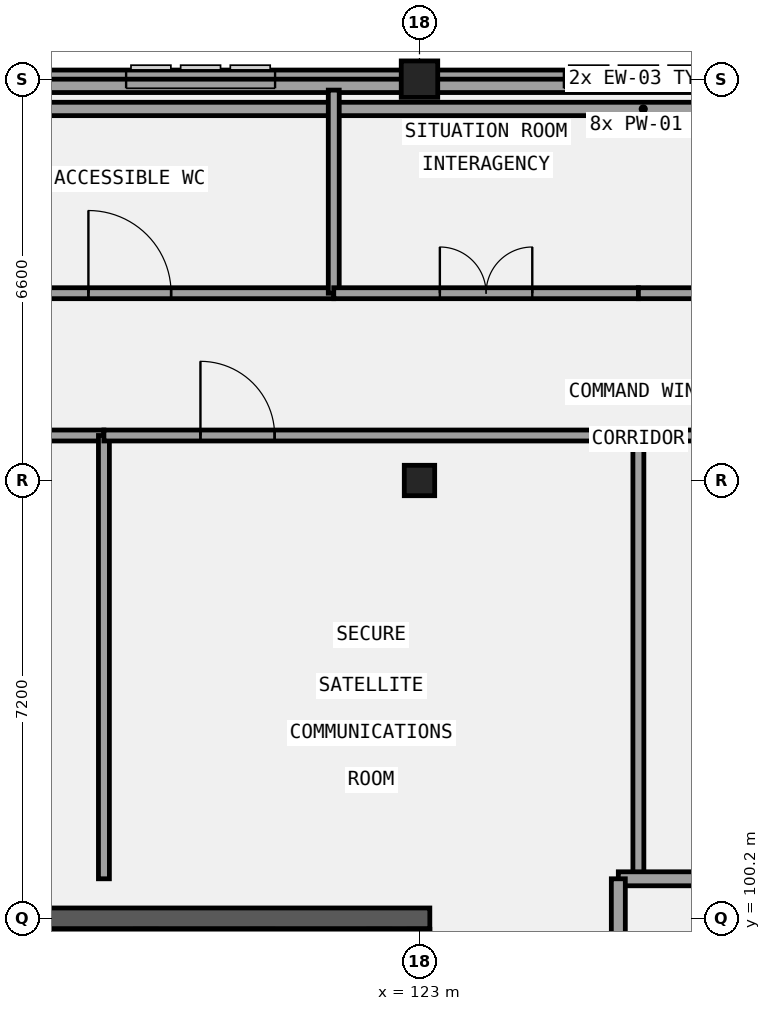
"""IFC4 building model, lengths in metres.
Left out: names, types, materials, properties, quantities, classifications, styles, units other than length and angle.
Written with IfcOpenShell. Run it as: python <this file> out.ifc"""

import sys

from ifc_helpers import new_model, si_unit, direction, frame, frame_2d, origin, origin_2d, place, context, subcontext, project, spatial, rectangle, extrude, element, fill, save


model = new_model("IFC4")
c1 = context("Model", 3, precision=1e-05, world=origin(), true_north=direction((0.0, 1.0)))
c2 = subcontext(c1, "Body", "Model", "MODEL_VIEW")
j1 = project(units=[si_unit("LENGTHUNIT", "METRE"), si_unit("PLANEANGLEUNIT", "RADIAN")], contexts=[c1])
p1 = place(None, origin())
s1 = spatial("IfcSite", under=j1, at=p1, CompositionType="ELEMENT")
p2 = place(p1, origin())
s2 = spatial("IfcBuilding", under=s1, at=p2, CompositionType="ELEMENT")
p3 = place(p2, frame((0.0, 0.0, 30.9)))
s3 = spatial("IfcBuildingStorey", under=s2, at=p3, CompositionType="ELEMENT", Elevation=30.9)
p4 = place(p3, frame((108.43, 100.2, 0.0), z_axis=(0.0, 0.0, 1.0), x_axis=(1.0, 0.0, 0.0)))
e1 = element("IfcWall", 1, at=p4, inside=s3, PredefinedType="SHEAR", context=c2, shape_type="SweptSolid", body=[
    extrude(rectangle(XDim=14.74, YDim=0.34, at=frame_2d((7.37, 0.0))), origin(), (0.0, 0.0, 1.0), 4.5),
])
p5 = place(p3, frame((123.0, 93.18, 0.0), z_axis=(0.0, 0.0, 1.0), x_axis=(0.0, 1.0, 0.0)))
e2 = element("IfcWall", 2, at=p5, inside=s3, PredefinedType="SHEAR", context=c2, shape_type="SweptSolid", body=[
    extrude(rectangle(XDim=6.84, YDim=0.34, at=frame_2d((3.42, 0.0))), origin(), (0.0, 0.0, 1.0), 4.5),
])
for number, where, z_axis, x_axis in (
    (3, (118.5, 96.8, 0.0), (0.0, 0.0, 1.0), (0.0, 1.0, 0.0)),
    (4, (120.42, 96.8, 0.0), (0.0, 0.0, 1.0), (0.0, 1.0, 0.0)),
    (5, (122.34, 96.8, 0.0), (0.0, 0.0, 1.0), (0.0, 1.0, 0.0)),
):
    element("IfcWall", number, at=place(p3, frame(where, z_axis=z_axis, x_axis=x_axis)), inside=s3, PredefinedType="SHEAR", context=c2, shape_type="SweptSolid", body=[
        extrude(rectangle(XDim=3.22, YDim=0.34, at=frame_2d((1.61, 0.0))), origin(), (0.0, 0.0, 1.0), 4.5),
    ])
p6 = place(p3, frame((123.0, 107.4, 0.0), z_axis=(0.0, 0.0, 1.0), x_axis=(1.0, 0.0, 0.0)))
e6 = element("IfcColumn", 6, at=p6, inside=s3, PredefinedType="COLUMN", context=c2, shape_type="SweptSolid", body=[
    extrude(rectangle(XDim=0.5, YDim=0.5, at=origin_2d()), origin(), (0.0, 0.0, 1.0), 4.5),
])
p7 = place(p3, frame((123.0, 114.0, 0.0), z_axis=(0.0, 0.0, 1.0), x_axis=(1.0, 0.0, 0.0)))
e7 = element("IfcColumn", 7, at=p7, inside=s3, PredefinedType="COLUMN", context=c2, shape_type="SweptSolid", body=[
    extrude(rectangle(XDim=0.6, YDim=0.6, at=origin_2d()), origin(), (0.0, 0.0, 1.0), 4.5),
])
p8 = place(p3, frame((144.75, 114.0, 0.0), z_axis=(0.0, 0.0, 1.0), x_axis=(-1.0, 0.0, 0.0)))
e8 = element("IfcWall", 8, at=p8, inside=s3, PredefinedType="SOLIDWALL", context=c2, shape_type="SweptSolid", body=[
    extrude(rectangle(XDim=36.3, YDim=0.3, at=frame_2d((18.15, 0.0))), origin(), (0.0, 0.0, 1.0), 3.5),
])
p9 = place(p8, frame((31.45, 0.0, 0.95)))
e9 = element("IfcOpeningElement", 9, at=p9, cuts=e8, PredefinedType="OPENING", context=c2, shape_type="SweptSolid", body=[
    extrude(rectangle(XDim=2.2, YDim=2.15, at=frame_2d((1.1, 1.075))), frame((0.0, 0.16, 0.0), z_axis=(0.0, -1.0, 0.0), x_axis=(1.0, 0.0, 0.0)), (0.0, 0.0, 1.0), 0.32),
])
p10 = place(p8, frame((24.125, 0.0, 0.95)))
e10 = element("IfcOpeningElement", 10, at=p10, cuts=e8, PredefinedType="OPENING", context=c2, shape_type="SweptSolid", body=[
    extrude(rectangle(XDim=2.45, YDim=1.4, at=frame_2d((1.225, 0.7))), frame((0.0, 0.16, 0.0), z_axis=(0.0, -1.0, 0.0), x_axis=(1.0, 0.0, 0.0)), (0.0, 0.0, 1.0), 0.32),
])
p11 = place(p8, frame((16.925, 0.0, 0.95)))
e11 = element("IfcOpeningElement", 11, at=p11, cuts=e8, PredefinedType="OPENING", context=c2, shape_type="SweptSolid", body=[
    extrude(rectangle(XDim=2.45, YDim=1.65, at=frame_2d((1.225, 0.825))), frame((0.0, 0.16, 0.0), z_axis=(0.0, -1.0, 0.0), x_axis=(1.0, 0.0, 0.0)), (0.0, 0.0, 1.0), 0.32),
])
p12 = place(p8, frame((9.725, 0.0, 0.95)))
e12 = element("IfcOpeningElement", 12, at=p12, cuts=e8, PredefinedType="OPENING", context=c2, shape_type="SweptSolid", body=[
    extrude(rectangle(XDim=2.45, YDim=1.9, at=frame_2d((1.225, 0.95))), frame((0.0, 0.16, 0.0), z_axis=(0.0, -1.0, 0.0), x_axis=(1.0, 0.0, 0.0)), (0.0, 0.0, 1.0), 0.32),
])
p13 = place(p8, frame((2.525, 0.0, 0.95)))
e13 = element("IfcOpeningElement", 13, at=p13, cuts=e8, PredefinedType="OPENING", context=c2, shape_type="SweptSolid", body=[
    extrude(rectangle(XDim=2.45, YDim=2.15, at=frame_2d((1.225, 1.075))), frame((0.0, 0.16, 0.0), z_axis=(0.0, -1.0, 0.0), x_axis=(1.0, 0.0, 0.0)), (0.0, 0.0, 1.0), 0.32),
])
p14 = place(p3, frame((144.65, 113.51, 4.5), z_axis=(0.0, 0.0, 1.0), x_axis=(-1.0, 0.0, 0.0)))
e14 = element("IfcWall", 14, at=p14, inside=s3, PredefinedType="PARAPET", context=c2, shape_type="SweptSolid", body=[
    extrude(rectangle(XDim=35.94, YDim=0.22, at=frame_2d((17.97, 0.0))), origin(), (0.0, 0.0, 1.0), 1.12),
])
p15 = place(p3, frame((108.71, 113.89, 4.5), z_axis=(0.0, 0.0, 1.0), x_axis=(1.0, 0.0, 0.0)))
e15 = element("IfcWall", 15, at=p15, inside=s3, PredefinedType="PARAPET", context=c2, shape_type="SweptSolid", body=[
    extrude(rectangle(XDim=35.89, YDim=0.22, at=frame_2d((17.945, 0.0))), origin(), (0.0, 0.0, 1.0), 1.12),
])
p16 = place(p3, frame((109.02, 108.14, 0.0), z_axis=(0.0, 0.0, 1.0), x_axis=(1.0, 0.0, 0.0)))
e16 = element("IfcWall", 16, at=p16, inside=s3, PredefinedType="PARTITIONING", context=c2, shape_type="SweptSolid", body=[
    extrude(rectangle(XDim=8.79, YDim=0.18, at=frame_2d((4.395, 0.0))), origin(), (0.0, 0.0, 1.0), 4.25),
])
p17 = place(p16, frame((3.785, 0.0, 0.0)))
e17 = element("IfcOpeningElement", 17, at=p17, cuts=e16, PredefinedType="OPENING", context=c2, shape_type="SweptSolid", body=[
    extrude(rectangle(XDim=1.22, YDim=2.1, at=frame_2d((0.61, 1.05))), frame((0.0, 0.1, 0.0), z_axis=(0.0, -1.0, 0.0), x_axis=(1.0, 0.0, 0.0)), (0.0, 0.0, 1.0), 0.2),
])
p18 = place(p3, frame((117.81, 100.85, 0.0), z_axis=(0.0, 0.0, 1.0), x_axis=(0.0, 1.0, 0.0)))
e18 = element("IfcWall", 18, at=p18, inside=s3, PredefinedType="PARTITIONING", context=c2, shape_type="SweptSolid", body=[
    extrude(rectangle(XDim=7.29, YDim=0.18, at=frame_2d((3.645, 0.0))), origin(), (0.0, 0.0, 1.0), 4.25),
])
p19 = place(p3, frame((117.81, 108.14, 0.0), z_axis=(0.0, 0.0, 1.0), x_axis=(1.0, 0.0, 0.0)))
e19 = element("IfcWall", 19, at=p19, inside=s3, PredefinedType="PARTITIONING", context=c2, shape_type="SweptSolid", body=[
    extrude(rectangle(XDim=8.79, YDim=0.18, at=frame_2d((4.395, 0.0))), origin(), (0.0, 0.0, 1.0), 4.25),
])
p20 = place(p19, frame((1.587, 0.0, 0.0)))
e20 = element("IfcOpeningElement", 20, at=p20, cuts=e19, PredefinedType="OPENING", context=c2, shape_type="SweptSolid", body=[
    extrude(rectangle(XDim=1.22, YDim=2.22, at=frame_2d((0.61, 1.11))), frame((0.0, 0.1, 0.0), z_axis=(0.0, -1.0, 0.0), x_axis=(1.0, 0.0, 0.0)), (0.0, 0.0, 1.0), 0.2),
])
p21 = place(p3, frame((126.6, 100.85, 0.0), z_axis=(0.0, 0.0, 1.0), x_axis=(0.0, 1.0, 0.0)))
e21 = element("IfcWall", 21, at=p21, inside=s3, PredefinedType="PARTITIONING", context=c2, shape_type="SweptSolid", body=[
    extrude(rectangle(XDim=7.29, YDim=0.18, at=frame_2d((3.645, 0.0))), origin(), (0.0, 0.0, 1.0), 4.25),
])
p22 = place(p3, frame((126.6, 108.14, 0.0), z_axis=(0.0, 0.0, 1.0), x_axis=(1.0, 0.0, 0.0)))
e22 = element("IfcWall", 22, at=p22, inside=s3, PredefinedType="PARTITIONING", context=c2, shape_type="SweptSolid", body=[
    extrude(rectangle(XDim=8.79, YDim=0.18, at=frame_2d((4.395, 0.0))), origin(), (0.0, 0.0, 1.0), 4.25),
])
p23 = place(p22, frame((5.982, 0.0, 0.0)))
e23 = element("IfcOpeningElement", 23, at=p23, cuts=e22, PredefinedType="OPENING", context=c2, shape_type="SweptSolid", body=[
    extrude(rectangle(XDim=1.22, YDim=2.35, at=frame_2d((0.61, 1.175))), frame((0.0, 0.1, 0.0), z_axis=(0.0, -1.0, 0.0), x_axis=(1.0, 0.0, 0.0)), (0.0, 0.0, 1.0), 0.2),
])
p24 = place(p3, frame((114.88, 110.48, 0.0), z_axis=(0.0, 0.0, 1.0), x_axis=(1.0, 0.0, 0.0)))
e24 = element("IfcWall", 24, at=p24, inside=s3, PredefinedType="PARTITIONING", context=c2, shape_type="SweptSolid", body=[
    extrude(rectangle(XDim=6.71, YDim=0.18, at=frame_2d((3.355, 0.0))), origin(), (0.0, 0.0, 1.0), 3.7),
])
p25 = place(p24, frame((2.675, 0.0, 0.0)))
e25 = element("IfcOpeningElement", 25, at=p25, cuts=e24, PredefinedType="OPENING", context=c2, shape_type="SweptSolid", body=[
    extrude(rectangle(XDim=1.36, YDim=2.35, at=frame_2d((0.68, 1.175))), frame((0.0, 0.1, 0.0), z_axis=(0.0, -1.0, 0.0), x_axis=(1.0, 0.0, 0.0)), (0.0, 0.0, 1.0), 0.2),
])
p26 = place(p3, frame((121.59, 110.48, 0.0), z_axis=(0.0, 0.0, 1.0), x_axis=(0.0, 1.0, 0.0)))
e26 = element("IfcWall", 26, at=p26, inside=s3, PredefinedType="PARTITIONING", context=c2, shape_type="SweptSolid", body=[
    extrude(rectangle(XDim=3.34, YDim=0.18, at=frame_2d((1.67, 0.0))), origin(), (0.0, 0.0, 1.0), 4.25),
])
p27 = place(p3, frame((121.59, 110.48, 0.0), z_axis=(0.0, 0.0, 1.0), x_axis=(1.0, 0.0, 0.0)))
e27 = element("IfcWall", 27, at=p27, inside=s3, PredefinedType="PARTITIONING", context=c2, shape_type="SweptSolid", body=[
    extrude(rectangle(XDim=5.01, YDim=0.18, at=frame_2d((2.505, 0.0))), origin(), (0.0, 0.0, 1.0), 3.7),
])
p28 = place(p27, frame((1.745, 0.0, 0.0)))
e28 = element("IfcOpeningElement", 28, at=p28, cuts=e27, PredefinedType="OPENING", context=c2, shape_type="SweptSolid", body=[
    extrude(rectangle(XDim=1.52, YDim=2.1, at=frame_2d((0.76, 1.05))), frame((0.0, 0.1, 0.0), z_axis=(0.0, -1.0, 0.0), x_axis=(1.0, 0.0, 0.0)), (0.0, 0.0, 1.0), 0.2),
])
p29 = place(p3, frame((126.6, 110.48, 0.0), z_axis=(0.0, 0.0, 1.0), x_axis=(1.0, 0.0, 0.0)))
e29 = element("IfcWall", 29, at=p29, inside=s3, PredefinedType="PARTITIONING", context=c2, shape_type="SweptSolid", body=[
    extrude(rectangle(XDim=5.01, YDim=0.18, at=frame_2d((2.505, 0.0))), origin(), (0.0, 0.0, 1.0), 3.7),
])
p30 = place(p29, frame((1.745, 0.0, 0.0)))
e30 = element("IfcOpeningElement", 30, at=p30, cuts=e29, PredefinedType="OPENING", context=c2, shape_type="SweptSolid", body=[
    extrude(rectangle(XDim=1.52, YDim=2.22, at=frame_2d((0.76, 1.11))), frame((0.0, 0.1, 0.0), z_axis=(0.0, -1.0, 0.0), x_axis=(1.0, 0.0, 0.0)), (0.0, 0.0, 1.0), 0.2),
])
p31 = place(p3, frame((126.27, 100.85, 0.0), z_axis=(0.0, 0.0, 1.0), x_axis=(1.0, 0.0, 0.0)))
e31 = element("IfcWall", 31, at=p31, inside=s3, PredefinedType="PARTITIONING", context=c2, shape_type="SweptSolid", body=[
    extrude(rectangle(XDim=3.28, YDim=0.23, at=frame_2d((1.64, 0.0))), origin(), (0.0, 0.0, 1.0), 4.25),
])
p32 = place(p3, frame((126.27, 95.425, 0.0), z_axis=(0.0, 0.0, 1.0), x_axis=(0.0, 1.0, 0.0)))
e32 = element("IfcWall", 32, at=p32, inside=s3, PredefinedType="PARTITIONING", context=c2, shape_type="SweptSolid", body=[
    extrude(rectangle(XDim=5.425, YDim=0.23, at=frame_2d((2.712, 0.0))), origin(), (0.0, 0.0, 1.0), 4.25),
])
p33 = place(p32, frame((2.222, 0.0, 0.0)))
e33 = element("IfcOpeningElement", 33, at=p33, cuts=e32, PredefinedType="OPENING", context=c2, shape_type="SweptSolid", body=[
    extrude(rectangle(XDim=0.98, YDim=2.35, at=frame_2d((0.49, 1.175))), frame((0.0, 0.125, 0.0), z_axis=(0.0, -1.0, 0.0), x_axis=(1.0, 0.0, 0.0)), (0.0, 0.0, 1.0), 0.25),
])
p34 = place(p10, origin())
e34 = element("IfcWindow", 34, at=p34, inside=s3, PartitioningType="SINGLE_PANEL", PredefinedType="WINDOW", context=c2, shape_type="SweptSolid", body=[
    extrude(rectangle(XDim=2.45, YDim=1.4, at=frame_2d((1.225, 0.7))), frame((0.0, 0.03, 0.0), z_axis=(0.0, -1.0, 0.0), x_axis=(1.0, 0.0, 0.0)), (0.0, 0.0, 1.0), 0.06),
])
fill(e10, e34)
p35 = place(p11, origin())
e35 = element("IfcWindow", 35, at=p35, inside=s3, PartitioningType="SINGLE_PANEL", PredefinedType="WINDOW", context=c2, shape_type="SweptSolid", body=[
    extrude(rectangle(XDim=2.45, YDim=1.65, at=frame_2d((1.225, 0.825))), frame((0.0, 0.03, 0.0), z_axis=(0.0, -1.0, 0.0), x_axis=(1.0, 0.0, 0.0)), (0.0, 0.0, 1.0), 0.06),
])
fill(e11, e35)
p36 = place(p20, frame((1.22, 0.0, 0.0), z_axis=(0.0, 0.0, 1.0), x_axis=(-1.0, 0.0, 0.0)))
e36 = element("IfcDoor", 36, at=p36, inside=s3, OperationType="SINGLE_SWING_LEFT", PredefinedType="DOOR", context=c2, shape_type="SweptSolid", body=[
    extrude(rectangle(XDim=1.22, YDim=2.22, at=frame_2d((0.61, 1.11))), frame((0.0, 0.025, 0.0), z_axis=(0.0, -1.0, 0.0), x_axis=(1.0, 0.0, 0.0)), (0.0, 0.0, 1.0), 0.05),
])
fill(e20, e36)
p37 = place(p25, origin())
e37 = element("IfcDoor", 37, at=p37, inside=s3, OperationType="SINGLE_SWING_LEFT", PredefinedType="DOOR", context=c2, shape_type="SweptSolid", body=[
    extrude(rectangle(XDim=1.36, YDim=2.35, at=frame_2d((0.68, 1.175))), frame((0.0, 0.025, 0.0), z_axis=(0.0, -1.0, 0.0), x_axis=(1.0, 0.0, 0.0)), (0.0, 0.0, 1.0), 0.05),
])
fill(e25, e37)
p38 = place(p28, origin())
e38 = element("IfcDoor", 38, at=p38, inside=s3, OperationType="DOUBLE_DOOR_SINGLE_SWING", PredefinedType="DOOR", context=c2, shape_type="SweptSolid", body=[
    extrude(rectangle(XDim=1.52, YDim=2.1, at=frame_2d((0.76, 1.05))), frame((0.0, 0.025, 0.0), z_axis=(0.0, -1.0, 0.0), x_axis=(1.0, 0.0, 0.0)), (0.0, 0.0, 1.0), 0.05),
])
fill(e28, e38)
save(model, sys.argv[1])
